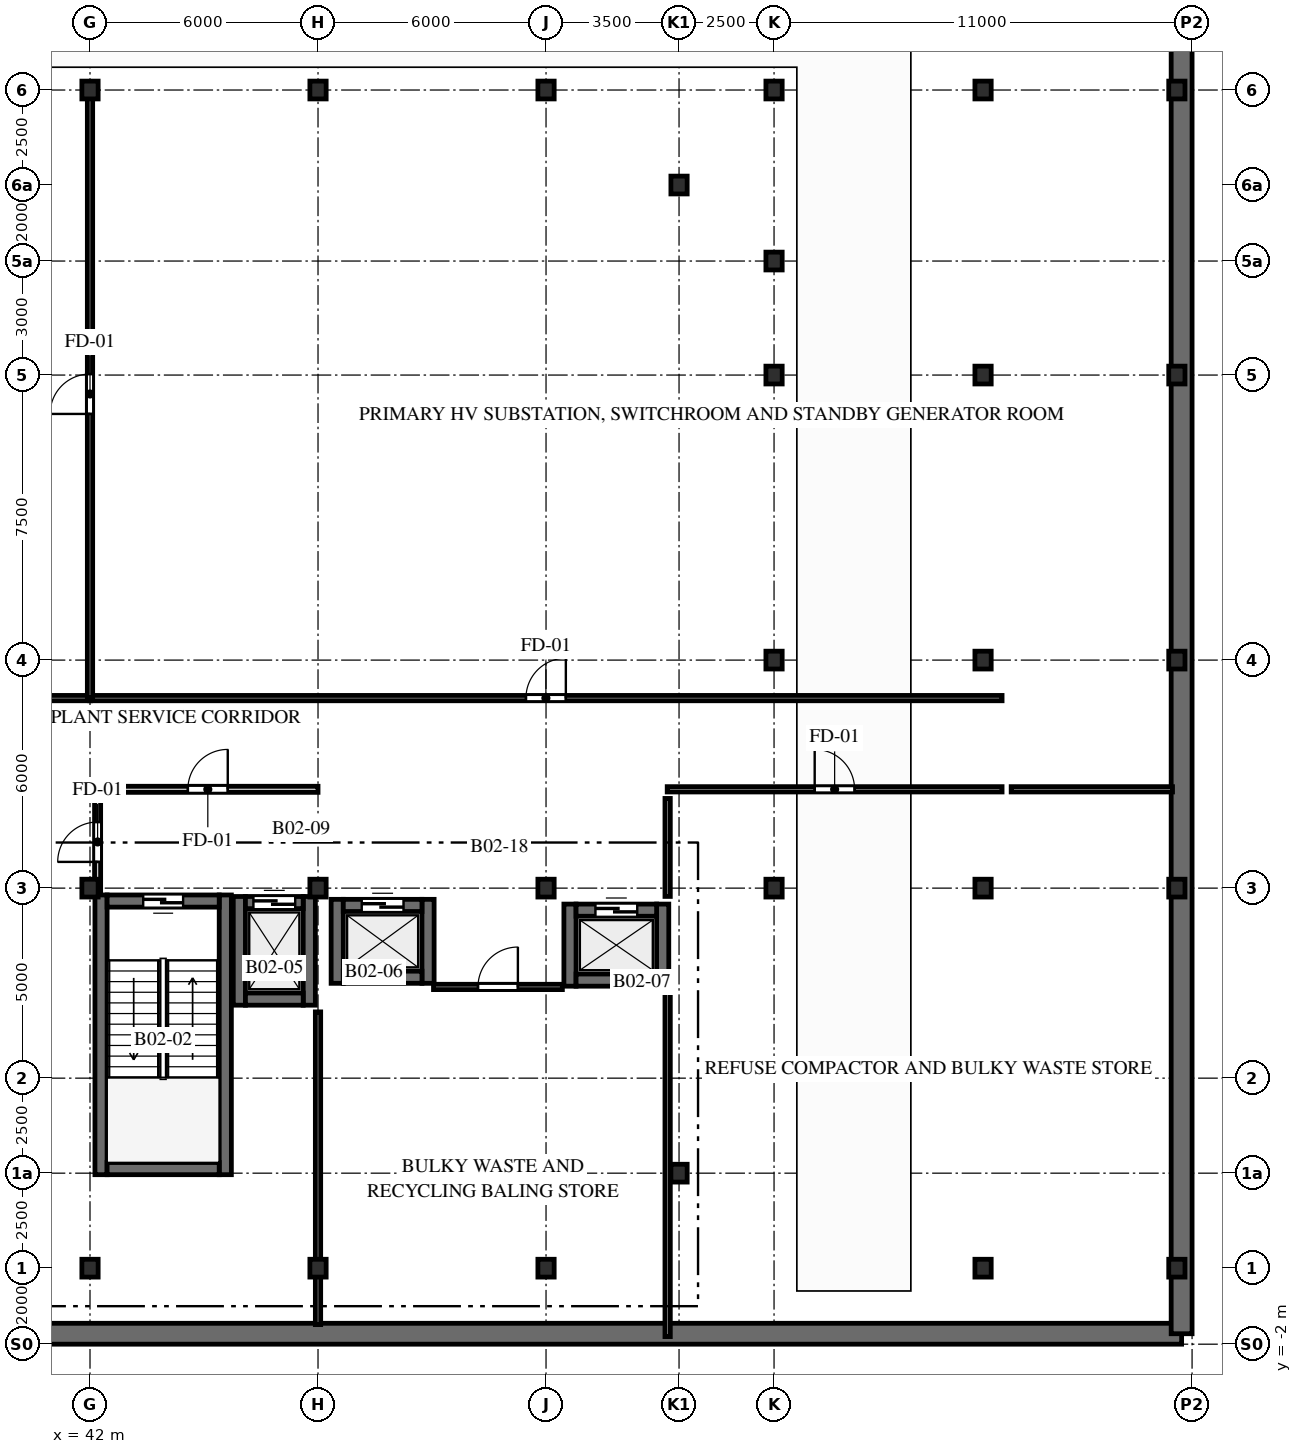
"""IFC4 building model, lengths in metres.
Left out: names, types, materials, properties, quantities, classifications, styles, units other than length and angle.
Written with IfcOpenShell. Run it as: python <this file> out.ifc"""

import sys

from ifc_helpers import new_model, si_unit, direction, frame, frame_2d, origin, origin_2d, place, context, subcontext, project, spatial, rectangle, i_section, extrude, element, fill, save


model = new_model("IFC4")
c1 = context("Model", 3, precision=1e-05, world=origin(), true_north=direction((0.0, 1.0)))
c2 = subcontext(c1, "Body", "Model", "MODEL_VIEW")
j1 = project(units=[si_unit("LENGTHUNIT", "METRE"), si_unit("PLANEANGLEUNIT", "RADIAN")], contexts=[c1])
p1 = place(None, origin())
s1 = spatial("IfcSite", under=j1, at=p1, CompositionType="ELEMENT")
p2 = place(p1, origin())
s2 = spatial("IfcBuilding", under=s1, at=p2, CompositionType="ELEMENT")
p3 = place(p2, frame((0.0, 0.0, -8.4)))
s3 = spatial("IfcBuildingStorey", under=s2, at=p3, CompositionType="ELEMENT", Elevation=-8.4)
for number, where, z_axis, x_axis in (
    (1, (42.0, 0.0, 0.0), (0.0, 0.0, 1.0), (1.0, 0.0, 0.0)),
    (2, (42.0, 10.0, 0.0), (0.0, 0.0, 1.0), (1.0, 0.0, 0.0)),
    (3, (42.0, 31.0, 0.0), (0.0, 0.0, 1.0), (1.0, 0.0, 0.0)),
    (4, (48.0, 0.0, 0.0), (0.0, 0.0, 1.0), (1.0, 0.0, 0.0)),
    (5, (48.0, 10.0, 0.0), (0.0, 0.0, 1.0), (1.0, 0.0, 0.0)),
    (6, (48.0, 31.0, 0.0), (0.0, 0.0, 1.0), (1.0, 0.0, 0.0)),
    (7, (54.0, 0.0, 0.0), (0.0, 0.0, 1.0), (1.0, 0.0, 0.0)),
    (8, (54.0, 10.0, 0.0), (0.0, 0.0, 1.0), (1.0, 0.0, 0.0)),
    (9, (54.0, 31.0, 0.0), (0.0, 0.0, 1.0), (1.0, 0.0, 0.0)),
    (10, (57.5, 2.5, 0.0), (0.0, 0.0, 1.0), (1.0, 0.0, 0.0)),
    (11, (57.5, 28.5, 0.0), (0.0, 0.0, 1.0), (1.0, 0.0, 0.0)),
    (12, (60.0, 10.0, 0.0), (0.0, 0.0, 1.0), (1.0, 0.0, 0.0)),
    (13, (60.0, 16.0, 0.0), (0.0, 0.0, 1.0), (1.0, 0.0, 0.0)),
    (14, (60.0, 23.5, 0.0), (0.0, 0.0, 1.0), (1.0, 0.0, 0.0)),
    (15, (60.0, 26.5, 0.0), (0.0, 0.0, 1.0), (1.0, 0.0, 0.0)),
    (16, (60.0, 31.0, 0.0), (0.0, 0.0, 1.0), (1.0, 0.0, 0.0)),
    (17, (65.5, 0.0, 0.0), (0.0, 0.0, 1.0), (1.0, 0.0, 0.0)),
    (18, (65.5, 10.0, 0.0), (0.0, 0.0, 1.0), (1.0, 0.0, 0.0)),
    (19, (65.5, 16.0, 0.0), (0.0, 0.0, 1.0), (1.0, 0.0, 0.0)),
    (20, (65.5, 23.5, 0.0), (0.0, 0.0, 1.0), (1.0, 0.0, 0.0)),
    (21, (65.5, 31.0, 0.0), (0.0, 0.0, 1.0), (1.0, 0.0, 0.0)),
    (22, (70.6, 0.0, 0.0), (0.0, 0.0, 1.0), (1.0, 0.0, 0.0)),
    (23, (70.6, 10.0, 0.0), (0.0, 0.0, 1.0), (1.0, 0.0, 0.0)),
    (24, (70.6, 16.0, 0.0), (0.0, 0.0, 1.0), (1.0, 0.0, 0.0)),
    (25, (70.6, 23.5, 0.0), (0.0, 0.0, 1.0), (1.0, 0.0, 0.0)),
    (26, (70.6, 31.0, 0.0), (0.0, 0.0, 1.0), (1.0, 0.0, 0.0)),
):
    element("IfcColumn", number, at=place(p3, frame(where, z_axis=z_axis, x_axis=x_axis)), inside=s3, PredefinedType="COLUMN", context=c2, shape_type="SweptSolid", body=[
        extrude(i_section(OverallWidth=0.428, OverallDepth=0.469, WebThickness=0.078, FlangeThickness=0.125, FilletRadius=0.015, at=origin_2d()), origin(), (0.0, 0.0, 1.0), 4.2),
    ])
p4 = place(p3, frame((-10.725, -1.725, 0.0), z_axis=(0.0, 0.0, 1.0), x_axis=(1.0, 0.0, 0.0)))
e27 = element("IfcWall", 27, at=p4, inside=s3, PredefinedType="SHEAR", context=c2, shape_type="SweptSolid", body=[
    extrude(rectangle(XDim=81.45, YDim=0.55, at=frame_2d((40.725, 0.0))), origin(), (0.0, 0.0, 1.0), 3.2),
])
p5 = place(p3, frame((70.725, -1.725, 0.0), z_axis=(0.0, 0.0, 1.0), x_axis=(0.0, 1.0, 0.0)))
e28 = element("IfcWall", 28, at=p5, inside=s3, PredefinedType="SHEAR", context=c2, shape_type="SweptSolid", body=[
    extrude(rectangle(XDim=41.45, YDim=0.55, at=frame_2d((20.725, 0.0))), origin(), (0.0, 0.0, 1.0), 3.2),
])
for number, where, z_axis, x_axis in (
    (29, (42.29, 2.46, 0.0), (0.0, 0.0, 1.0), (0.0, 1.0, 0.0)),
    (30, (45.56, 2.46, 0.0), (0.0, 0.0, 1.0), (0.0, 1.0, 0.0)),
):
    element("IfcWall", number, at=place(p3, frame(where, z_axis=z_axis, x_axis=x_axis)), inside=s3, PredefinedType="SHEAR", context=c2, shape_type="SweptSolid", body=[
        extrude(rectangle(XDim=7.36, YDim=0.32, at=frame_2d((3.68, 0.0))), origin(), (0.0, 0.0, 1.0), 3.84),
    ])
p6 = place(p3, frame((42.45, 2.62, 0.0), z_axis=(0.0, 0.0, 1.0), x_axis=(1.0, 0.0, 0.0)))
e31 = element("IfcWall", 31, at=p6, inside=s3, PredefinedType="SHEAR", context=c2, shape_type="SweptSolid", body=[
    extrude(rectangle(XDim=2.95, YDim=0.32, at=frame_2d((1.475, 0.0))), origin(), (0.0, 0.0, 1.0), 3.84),
])
p7 = place(p3, frame((45.4, 9.66, 0.0), z_axis=(0.0, 0.0, 1.0), x_axis=(-1.0, 0.0, 0.0)))
e32 = element("IfcWall", 32, at=p7, inside=s3, PredefinedType="SHEAR", context=c2, shape_type="SweptSolid", body=[
    extrude(rectangle(XDim=2.95, YDim=0.32, at=frame_2d((1.475, 0.0))), origin(), (0.0, 0.0, 1.0), 3.84),
])
p8 = place(p7, frame((0.95, 0.0, 0.0)))
e33 = element("IfcOpeningElement", 33, at=p8, cuts=e32, PredefinedType="OPENING", context=c2, shape_type="SweptSolid", body=[
    extrude(rectangle(XDim=1.05, YDim=2.06, at=frame_2d((0.525, 1.03))), frame((0.0, 0.17, 0.0), z_axis=(0.0, -1.0, 0.0), x_axis=(1.0, 0.0, 0.0)), (0.0, 0.0, 1.0), 0.34),
])
for number, where, z_axis, x_axis in (
    (34, (45.93, 6.92, 0.0), (0.0, 0.0, 1.0), (0.0, 1.0, 0.0)),
    (35, (47.77, 6.92, 0.0), (0.0, 0.0, 1.0), (0.0, 1.0, 0.0)),
):
    element("IfcWall", number, at=place(p3, frame(where, z_axis=z_axis, x_axis=x_axis)), inside=s3, PredefinedType="SHEAR", context=c2, shape_type="SweptSolid", body=[
        extrude(rectangle(XDim=2.86, YDim=0.32, at=frame_2d((1.43, 0.0))), origin(), (0.0, 0.0, 1.0), 3.84),
    ])
p9 = place(p3, frame((46.09, 7.08, 0.0), z_axis=(0.0, 0.0, 1.0), x_axis=(1.0, 0.0, 0.0)))
e36 = element("IfcWall", 36, at=p9, inside=s3, PredefinedType="SHEAR", context=c2, shape_type="SweptSolid", body=[
    extrude(rectangle(XDim=1.52, YDim=0.32, at=frame_2d((0.76, 0.0))), origin(), (0.0, 0.0, 1.0), 3.84),
])
p10 = place(p3, frame((46.09, 9.62, 0.0), z_axis=(0.0, 0.0, 1.0), x_axis=(1.0, 0.0, 0.0)))
e37 = element("IfcWall", 37, at=p10, inside=s3, PredefinedType="SHEAR", context=c2, shape_type="SweptSolid", body=[
    extrude(rectangle(XDim=1.52, YDim=0.32, at=frame_2d((0.76, 0.0))), origin(), (0.0, 0.0, 1.0), 3.84),
])
p11 = place(p10, frame((0.21, 0.0, 0.0)))
e38 = element("IfcOpeningElement", 38, at=p11, cuts=e37, PredefinedType="OPENING", context=c2, shape_type="SweptSolid", body=[
    extrude(rectangle(XDim=1.1, YDim=2.06, at=frame_2d((0.55, 1.03))), frame((0.0, 0.17, 0.0), z_axis=(0.0, -1.0, 0.0), x_axis=(1.0, 0.0, 0.0)), (0.0, 0.0, 1.0), 0.34),
])
for number, where, z_axis, x_axis in (
    (39, (48.505, 7.495, 0.0), (0.0, 0.0, 1.0), (0.0, 1.0, 0.0)),
    (40, (50.895, 7.495, 0.0), (0.0, 0.0, 1.0), (0.0, 1.0, 0.0)),
):
    element("IfcWall", number, at=place(p3, frame(where, z_axis=z_axis, x_axis=x_axis)), inside=s3, PredefinedType="SHEAR", context=c2, shape_type="SweptSolid", body=[
        extrude(rectangle(XDim=2.21, YDim=0.32, at=frame_2d((1.105, 0.0))), origin(), (0.0, 0.0, 1.0), 3.84),
    ])
p12 = place(p3, frame((48.665, 7.655, 0.0), z_axis=(0.0, 0.0, 1.0), x_axis=(1.0, 0.0, 0.0)))
e41 = element("IfcWall", 41, at=p12, inside=s3, PredefinedType="SHEAR", context=c2, shape_type="SweptSolid", body=[
    extrude(rectangle(XDim=2.07, YDim=0.32, at=frame_2d((1.035, 0.0))), origin(), (0.0, 0.0, 1.0), 3.84),
])
p13 = place(p3, frame((48.665, 9.545, 0.0), z_axis=(0.0, 0.0, 1.0), x_axis=(1.0, 0.0, 0.0)))
e42 = element("IfcWall", 42, at=p13, inside=s3, PredefinedType="SHEAR", context=c2, shape_type="SweptSolid", body=[
    extrude(rectangle(XDim=2.07, YDim=0.32, at=frame_2d((1.035, 0.0))), origin(), (0.0, 0.0, 1.0), 3.84),
])
p14 = place(p13, frame((0.485, 0.0, 0.0)))
e43 = element("IfcOpeningElement", 43, at=p14, cuts=e42, PredefinedType="OPENING", context=c2, shape_type="SweptSolid", body=[
    extrude(rectangle(XDim=1.1, YDim=2.06, at=frame_2d((0.55, 1.03))), frame((0.0, 0.17, 0.0), z_axis=(0.0, -1.0, 0.0), x_axis=(1.0, 0.0, 0.0)), (0.0, 0.0, 1.0), 0.34),
])
for number, where, z_axis, x_axis in (
    (44, (54.63, 7.42, 0.0), (0.0, 0.0, 1.0), (0.0, 1.0, 0.0)),
    (45, (57.07, 7.42, 0.0), (0.0, 0.0, 1.0), (0.0, 1.0, 0.0)),
):
    element("IfcWall", number, at=place(p3, frame(where, z_axis=z_axis, x_axis=x_axis)), inside=s3, PredefinedType="SHEAR", context=c2, shape_type="SweptSolid", body=[
        extrude(rectangle(XDim=2.16, YDim=0.32, at=frame_2d((1.08, 0.0))), origin(), (0.0, 0.0, 1.0), 3.84),
    ])
p15 = place(p3, frame((54.79, 7.58, 0.0), z_axis=(0.0, 0.0, 1.0), x_axis=(1.0, 0.0, 0.0)))
e46 = element("IfcWall", 46, at=p15, inside=s3, PredefinedType="SHEAR", context=c2, shape_type="SweptSolid", body=[
    extrude(rectangle(XDim=2.12, YDim=0.32, at=frame_2d((1.06, 0.0))), origin(), (0.0, 0.0, 1.0), 3.84),
])
p16 = place(p3, frame((54.79, 9.42, 0.0), z_axis=(0.0, 0.0, 1.0), x_axis=(1.0, 0.0, 0.0)))
e47 = element("IfcWall", 47, at=p16, inside=s3, PredefinedType="SHEAR", context=c2, shape_type="SweptSolid", body=[
    extrude(rectangle(XDim=2.12, YDim=0.32, at=frame_2d((1.06, 0.0))), origin(), (0.0, 0.0, 1.0), 3.84),
])
p17 = place(p16, frame((0.51, 0.0, 0.0)))
e48 = element("IfcOpeningElement", 48, at=p17, cuts=e47, PredefinedType="OPENING", context=c2, shape_type="SweptSolid", body=[
    extrude(rectangle(XDim=1.1, YDim=2.06, at=frame_2d((0.55, 1.03))), frame((0.0, 0.17, 0.0), z_axis=(0.0, -1.0, 0.0), x_axis=(1.0, 0.0, 0.0)), (0.0, 0.0, 1.0), 0.34),
])
p18 = place(p3, frame((42.2, 9.83, 0.0), z_axis=(0.0, 0.0, 1.0), x_axis=(0.0, 1.0, 0.0)))
e49 = element("IfcWall", 49, at=p18, inside=s3, PredefinedType="PARTITIONING", context=c2, shape_type="SweptSolid", body=[
    extrude(rectangle(XDim=2.77, YDim=0.16, at=frame_2d((1.385, 0.0))), origin(), (0.0, 0.0, 1.0), 2.894),
])
p19 = place(p18, frame((0.86, 0.0, 0.0)))
e50 = element("IfcOpeningElement", 50, at=p19, cuts=e49, PredefinedType="OPENING", context=c2, shape_type="SweptSolid", body=[
    extrude(rectangle(XDim=1.05, YDim=2.06, at=frame_2d((0.525, 1.03))), frame((0.0, 0.09, 0.0), z_axis=(0.0, -1.0, 0.0), x_axis=(1.0, 0.0, 0.0)), (0.0, 0.0, 1.0), 0.18),
])
p20 = place(p3, frame((42.2, 12.6, 0.0), z_axis=(0.0, 0.0, 1.0), x_axis=(1.0, 0.0, 0.0)))
e51 = element("IfcWall", 51, at=p20, inside=s3, PredefinedType="PARTITIONING", context=c2, shape_type="SweptSolid", body=[
    extrude(rectangle(XDim=5.8, YDim=0.16, at=frame_2d((2.9, 0.0))), origin(), (0.0, 0.0, 1.0), 2.894),
])
p21 = place(p20, frame((2.375, 0.0, 0.0)))
e52 = element("IfcOpeningElement", 52, at=p21, cuts=e51, PredefinedType="OPENING", context=c2, shape_type="SweptSolid", body=[
    extrude(rectangle(XDim=1.05, YDim=2.06, at=frame_2d((0.525, 1.03))), frame((0.0, 0.09, 0.0), z_axis=(0.0, -1.0, 0.0), x_axis=(1.0, 0.0, 0.0)), (0.0, 0.0, 1.0), 0.18),
])
p22 = place(p3, frame((23.993, 15.0, 0.0), z_axis=(0.0, 0.0, 1.0), x_axis=(1.0, 0.0, 0.0)))
e53 = element("IfcWall", 53, at=p22, inside=s3, PredefinedType="PARTITIONING", context=c2, shape_type="SweptSolid", body=[
    extrude(rectangle(XDim=18.019, YDim=0.14, at=frame_2d((9.009, 0.0))), origin(), (0.0, 0.0, 1.0), 2.894),
])
p23 = place(p22, frame((8.484, 0.0, 0.0)))
e54 = element("IfcOpeningElement", 54, at=p23, cuts=e53, PredefinedType="OPENING", context=c2, shape_type="SweptSolid", body=[
    extrude(rectangle(XDim=1.05, YDim=2.06, at=frame_2d((0.525, 1.03))), frame((0.0, 0.08, 0.0), z_axis=(0.0, -1.0, 0.0), x_axis=(1.0, 0.0, 0.0)), (0.0, 0.0, 1.0), 0.16),
])
p24 = place(p3, frame((41.993, 15.0, 0.0), z_axis=(0.0, 0.0, 1.0), x_axis=(1.0, 0.0, 0.0)))
e55 = element("IfcWall", 55, at=p24, inside=s3, PredefinedType="PARTITIONING", context=c2, shape_type="SweptSolid", body=[
    extrude(rectangle(XDim=24.007, YDim=0.14, at=frame_2d((12.004, 0.0))), origin(), (0.0, 0.0, 1.0), 2.894),
])
p25 = place(p24, frame((11.479, 0.0, 0.0)))
e56 = element("IfcOpeningElement", 56, at=p25, cuts=e55, PredefinedType="OPENING", context=c2, shape_type="SweptSolid", body=[
    extrude(rectangle(XDim=1.05, YDim=2.06, at=frame_2d((0.525, 1.03))), frame((0.0, 0.08, 0.0), z_axis=(0.0, -1.0, 0.0), x_axis=(1.0, 0.0, 0.0)), (0.0, 0.0, 1.0), 0.16),
])
p26 = place(p3, frame((57.189, 12.6, 0.0), z_axis=(0.0, 0.0, 1.0), x_axis=(1.0, 0.0, 0.0)))
e57 = element("IfcWall", 57, at=p26, inside=s3, PredefinedType="PARTITIONING", context=c2, shape_type="SweptSolid", body=[
    extrude(rectangle(XDim=8.811, YDim=0.14, at=frame_2d((4.406, 0.0))), origin(), (0.0, 0.0, 1.0), 2.894),
])
p27 = place(p26, frame((3.881, 0.0, 0.0)))
e58 = element("IfcOpeningElement", 58, at=p27, cuts=e57, PredefinedType="OPENING", context=c2, shape_type="SweptSolid", body=[
    extrude(rectangle(XDim=1.05, YDim=2.06, at=frame_2d((0.525, 1.03))), frame((0.0, 0.08, 0.0), z_axis=(0.0, -1.0, 0.0), x_axis=(1.0, 0.0, 0.0)), (0.0, 0.0, 1.0), 0.16),
])
p28 = place(p3, frame((42.0, 15.004, 0.0), z_axis=(0.0, 0.0, 1.0), x_axis=(0.0, 1.0, 0.0)))
e59 = element("IfcWall", 59, at=p28, inside=s3, PredefinedType="PARTITIONING", context=c2, shape_type="SweptSolid", body=[
    extrude(rectangle(XDim=15.996, YDim=0.14, at=frame_2d((7.998, 0.0))), origin(), (0.0, 0.0, 1.0), 2.894),
])
p29 = place(p28, frame((7.473, 0.0, 0.0)))
e60 = element("IfcOpeningElement", 60, at=p29, cuts=e59, PredefinedType="OPENING", context=c2, shape_type="SweptSolid", body=[
    extrude(rectangle(XDim=1.05, YDim=2.06, at=frame_2d((0.525, 1.03))), frame((0.0, 0.08, 0.0), z_axis=(0.0, -1.0, 0.0), x_axis=(1.0, 0.0, 0.0)), (0.0, 0.0, 1.0), 0.16),
])
p30 = place(p3, frame((57.2, -1.8, 0.0), z_axis=(0.0, 0.0, 1.0), x_axis=(0.0, 1.0, 0.0)))
e61 = element("IfcWall", 61, at=p30, inside=s3, PredefinedType="PARTITIONING", context=c2, shape_type="SweptSolid", body=[
    extrude(rectangle(XDim=9.18, YDim=0.14, at=frame_2d((4.59, 0.0))), origin(), (0.0, 0.0, 1.0), 3.203),
])
p31 = place(p3, frame((51.039, 7.4, 0.0), z_axis=(0.0, 0.0, 1.0), x_axis=(1.0, 0.0, 0.0)))
e62 = element("IfcWall", 62, at=p31, inside=s3, PredefinedType="PARTITIONING", context=c2, shape_type="SweptSolid", body=[
    extrude(rectangle(XDim=3.391, YDim=0.14, at=frame_2d((1.696, 0.0))), origin(), (0.0, 0.0, 1.0), 2.894),
])
p32 = place(p31, frame((1.171, 0.0, 0.0)))
e63 = element("IfcOpeningElement", 63, at=p32, cuts=e62, PredefinedType="OPENING", context=c2, shape_type="SweptSolid", body=[
    extrude(rectangle(XDim=1.05, YDim=2.06, at=frame_2d((0.525, 1.03))), frame((0.0, 0.08, 0.0), z_axis=(0.0, -1.0, 0.0), x_axis=(1.0, 0.0, 0.0)), (0.0, 0.0, 1.0), 0.16),
])
p33 = place(p3, frame((66.24, 12.6, 0.0), z_axis=(0.0, 0.0, 1.0), x_axis=(1.0, 0.0, 0.0)))
e64 = element("IfcWall", 64, at=p33, inside=s3, PredefinedType="PARTITIONING", context=c2, shape_type="SweptSolid", body=[
    extrude(rectangle(XDim=4.245, YDim=0.14, at=frame_2d((2.123, 0.0))), origin(), (0.0, 0.0, 1.0), 3.203),
])
p34 = place(p3, frame((57.2, 9.781, 0.0), z_axis=(0.0, 0.0, 1.0), x_axis=(0.0, 1.0, 0.0)))
e65 = element("IfcWall", 65, at=p34, inside=s3, PredefinedType="PARTITIONING", context=c2, shape_type="SweptSolid", body=[
    extrude(rectangle(XDim=2.579, YDim=0.14, at=frame_2d((1.289, 0.0))), origin(), (0.0, 0.0, 1.0), 2.894),
])
p35 = place(p3, frame((48.0, -1.485, 0.0), z_axis=(0.0, 0.0, 1.0), x_axis=(0.0, 1.0, 0.0)))
e66 = element("IfcWall", 66, at=p35, inside=s3, PredefinedType="PARTITIONING", context=c2, shape_type="SweptSolid", body=[
    extrude(rectangle(XDim=8.229, YDim=0.14, at=frame_2d((4.114, 0.0))), origin(), (0.0, 0.0, 1.0), 2.894),
])
p36 = place(p8, origin())
e67 = element("IfcDoor", 67, at=p36, inside=s3, OperationType="SINGLE_SWING_LEFT", PredefinedType="DOOR", context=c2, shape_type="SweptSolid", body=[
    extrude(rectangle(XDim=1.05, YDim=2.06, at=frame_2d((0.525, 1.03))), frame((0.0, 0.025, 0.0), z_axis=(0.0, -1.0, 0.0), x_axis=(1.0, 0.0, 0.0)), (0.0, 0.0, 1.0), 0.05),
])
fill(e33, e67)
p37 = place(p11, origin())
e68 = element("IfcDoor", 68, at=p37, inside=s3, OperationType="SLIDING_TO_LEFT", PredefinedType="DOOR", context=c2, shape_type="SweptSolid", body=[
    extrude(rectangle(XDim=1.1, YDim=2.06, at=frame_2d((0.55, 1.03))), frame((0.0, 0.025, 0.0), z_axis=(0.0, -1.0, 0.0), x_axis=(1.0, 0.0, 0.0)), (0.0, 0.0, 1.0), 0.05),
])
fill(e38, e68)
p38 = place(p14, origin())
e69 = element("IfcDoor", 69, at=p38, inside=s3, OperationType="SLIDING_TO_RIGHT", PredefinedType="DOOR", context=c2, shape_type="SweptSolid", body=[
    extrude(rectangle(XDim=1.1, YDim=2.06, at=frame_2d((0.55, 1.03))), frame((0.0, 0.025, 0.0), z_axis=(0.0, -1.0, 0.0), x_axis=(1.0, 0.0, 0.0)), (0.0, 0.0, 1.0), 0.05),
])
fill(e43, e69)
p39 = place(p17, origin())
e70 = element("IfcDoor", 70, at=p39, inside=s3, OperationType="SLIDING_TO_LEFT", PredefinedType="DOOR", context=c2, shape_type="SweptSolid", body=[
    extrude(rectangle(XDim=1.1, YDim=2.06, at=frame_2d((0.55, 1.03))), frame((0.0, 0.025, 0.0), z_axis=(0.0, -1.0, 0.0), x_axis=(1.0, 0.0, 0.0)), (0.0, 0.0, 1.0), 0.05),
])
fill(e48, e70)
p40 = place(p19, origin())
e71 = element("IfcDoor", 71, at=p40, inside=s3, OperationType="SINGLE_SWING_LEFT", PredefinedType="DOOR", context=c2, shape_type="SweptSolid", body=[
    extrude(rectangle(XDim=1.05, YDim=2.06, at=frame_2d((0.525, 1.03))), frame((0.0, 0.025, 0.0), z_axis=(0.0, -1.0, 0.0), x_axis=(1.0, 0.0, 0.0)), (0.0, 0.0, 1.0), 0.05),
])
fill(e50, e71)
p41 = place(p21, origin())
e72 = element("IfcDoor", 72, at=p41, inside=s3, OperationType="SINGLE_SWING_RIGHT", PredefinedType="DOOR", context=c2, shape_type="SweptSolid", body=[
    extrude(rectangle(XDim=1.05, YDim=2.06, at=frame_2d((0.525, 1.03))), frame((0.0, 0.025, 0.0), z_axis=(0.0, -1.0, 0.0), x_axis=(1.0, 0.0, 0.0)), (0.0, 0.0, 1.0), 0.05),
])
fill(e52, e72)
p42 = place(p25, origin())
e73 = element("IfcDoor", 73, at=p42, inside=s3, OperationType="SINGLE_SWING_RIGHT", PredefinedType="DOOR", context=c2, shape_type="SweptSolid", body=[
    extrude(rectangle(XDim=1.05, YDim=2.06, at=frame_2d((0.525, 1.03))), frame((0.0, 0.025, 0.0), z_axis=(0.0, -1.0, 0.0), x_axis=(1.0, 0.0, 0.0)), (0.0, 0.0, 1.0), 0.05),
])
fill(e56, e73)
p43 = place(p27, origin())
e74 = element("IfcDoor", 74, at=p43, inside=s3, OperationType="SINGLE_SWING_LEFT", PredefinedType="DOOR", context=c2, shape_type="SweptSolid", body=[
    extrude(rectangle(XDim=1.05, YDim=2.06, at=frame_2d((0.525, 1.03))), frame((0.0, 0.025, 0.0), z_axis=(0.0, -1.0, 0.0), x_axis=(1.0, 0.0, 0.0)), (0.0, 0.0, 1.0), 0.05),
])
fill(e58, e74)
p44 = place(p29, origin())
e75 = element("IfcDoor", 75, at=p44, inside=s3, OperationType="SINGLE_SWING_LEFT", PredefinedType="DOOR", context=c2, shape_type="SweptSolid", body=[
    extrude(rectangle(XDim=1.05, YDim=2.06, at=frame_2d((0.525, 1.03))), frame((0.0, 0.025, 0.0), z_axis=(0.0, -1.0, 0.0), x_axis=(1.0, 0.0, 0.0)), (0.0, 0.0, 1.0), 0.05),
])
fill(e60, e75)
p45 = place(p32, origin())
e76 = element("IfcDoor", 76, at=p45, inside=s3, OperationType="SINGLE_SWING_RIGHT", PredefinedType="DOOR", context=c2, shape_type="SweptSolid", body=[
    extrude(rectangle(XDim=1.05, YDim=2.06, at=frame_2d((0.525, 1.03))), frame((0.0, 0.025, 0.0), z_axis=(0.0, -1.0, 0.0), x_axis=(1.0, 0.0, 0.0)), (0.0, 0.0, 1.0), 0.05),
])
fill(e63, e76)
save(model, sys.argv[1])
